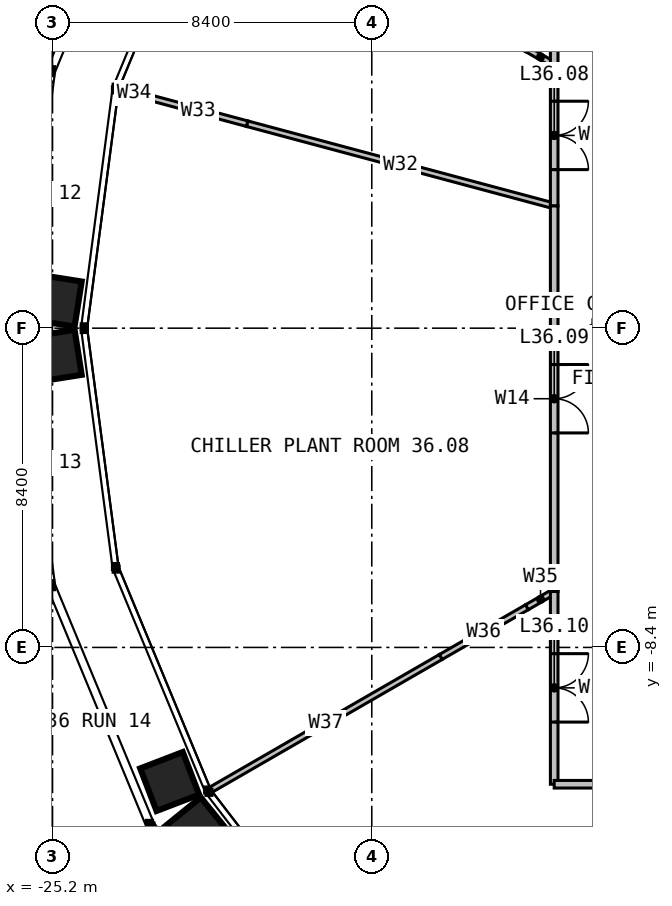
"""IFC4 building model, lengths in metres.
Left out: names, types, materials, properties, quantities, classifications, styles, units other than length and angle.
Written with IfcOpenShell. Run it as: python <this file> out.ifc"""

import sys

from ifc_helpers import new_model, si_unit, direction, frame, frame_2d, origin, place, context, subcontext, project, spatial, rectangle, extrude, element, fill, save


model = new_model("IFC4")
c1 = context("Model", 3, precision=1e-05, world=origin(), true_north=direction((0.0, 1.0)))
c2 = subcontext(c1, "Body", "Model", "MODEL_VIEW")
j1 = project(units=[si_unit("LENGTHUNIT", "METRE"), si_unit("PLANEANGLEUNIT", "RADIAN")], contexts=[c1])
p1 = place(None, origin())
s1 = spatial("IfcSite", under=j1, at=p1, CompositionType="ELEMENT")
p2 = place(p1, origin())
s2 = spatial("IfcBuilding", under=s1, at=p2, CompositionType="ELEMENT")
p3 = place(p2, frame((0.0, 0.0, 150.0)))
s3 = spatial("IfcBuildingStorey", under=s2, at=p3, CompositionType="ELEMENT", Elevation=150.0)
p4 = place(p3, frame((-12.0, 6.928, 0.0), z_axis=(0.0, 0.0, 1.0), x_axis=(-0.86608282171, 0.499900536046, 0.0)))
e1 = element("IfcWall", 1, at=p4, inside=s3, PredefinedType="PARTITIONING", context=c2, shape_type="SweptSolid", body=[
    extrude(rectangle(XDim=0.831, YDim=0.15, at=frame_2d((0.416, 0.0))), origin(), (0.0, 0.0, 1.0), 4.8),
])
p5 = place(p3, frame((-12.0, 3.215, 0.0), z_axis=(0.0, 0.0, 1.0), x_axis=(-0.965920824038, 0.258837713037, 0.0)))
e2 = element("IfcWall", 2, at=p5, inside=s3, PredefinedType="PARTITIONING", context=c2, shape_type="SweptSolid", body=[
    extrude(rectangle(XDim=8.365, YDim=0.15, at=frame_2d((4.183, 0.0))), origin(), (0.0, 0.0, 1.0), 4.8),
])
p6 = place(p3, frame((-20.08, 5.381, 0.0), z_axis=(0.0, 0.0, 1.0), x_axis=(-0.965936190415, 0.258780362559, 0.0)))
e3 = element("IfcWall", 3, at=p6, inside=s3, PredefinedType="PARTITIONING", context=c2, shape_type="SweptSolid", body=[
    extrude(rectangle(XDim=2.664, YDim=0.15, at=frame_2d((1.332, 0.0))), origin(), (0.0, 0.0, 1.0), 3.79),
])
p7 = place(p3, frame((-22.654, 6.07, 0.0), z_axis=(0.0, 0.0, 1.0), x_axis=(-0.96592035307, 0.258839470569, 0.0)))
e4 = element("IfcWall", 4, at=p7, inside=s3, PredefinedType="PARTITIONING", context=c2, shape_type="SweptSolid", body=[
    extrude(rectangle(XDim=0.826, YDim=0.15, at=frame_2d((0.413, 0.0))), origin(), (0.0, 0.0, 1.0), 4.8),
])
p8 = place(p3, frame((-12.0, -6.928, 0.0), z_axis=(0.0, 0.0, 1.0), x_axis=(-0.86608282171, -0.499900536046, 0.0)))
e5 = element("IfcWall", 5, at=p8, inside=s3, PredefinedType="PARTITIONING", context=c2, shape_type="SweptSolid", body=[
    extrude(rectangle(XDim=0.831, YDim=0.15, at=frame_2d((0.416, 0.0))), origin(), (0.0, 0.0, 1.0), 4.8),
])
p9 = place(p3, frame((-12.719, -7.344, 0.0), z_axis=(0.0, 0.0, 1.0), x_axis=(-0.866002361659, -0.500039908008, 0.0)))
e6 = element("IfcWall", 6, at=p9, inside=s3, PredefinedType="PARTITIONING", context=c2, shape_type="SweptSolid", body=[
    extrude(rectangle(XDim=2.618, YDim=0.15, at=frame_2d((1.309, 0.0))), origin(), (0.0, 0.0, 1.0), 3.79),
])
p10 = place(p3, frame((-14.987, -8.653, 0.0), z_axis=(0.0, 0.0, 1.0), x_axis=(-0.86602409414, -0.500002268364, 0.0)))
e7 = element("IfcWall", 7, at=p10, inside=s3, PredefinedType="PARTITIONING", context=c2, shape_type="SweptSolid", body=[
    extrude(rectangle(XDim=6.974, YDim=0.15, at=frame_2d((3.487, 0.0))), origin(), (0.0, 0.0, 1.0), 4.8),
])
p11 = place(p3, frame((-6.928, -12.0, 0.0), z_axis=(0.0, 0.0, 1.0), x_axis=(-0.500003616288, -0.866023315909, 0.0)))
e8 = element("IfcWall", 8, at=p11, inside=s3, PredefinedType="PARTITIONING", context=c2, shape_type="SweptSolid", body=[
    extrude(rectangle(XDim=10.423, YDim=0.15, at=frame_2d((5.211, 0.0))), origin(), (0.0, 0.0, 1.0), 4.8),
])
p12 = place(p3, frame((-12.0, 12.0, 0.0), z_axis=(0.0, 0.0, 1.0), x_axis=(0.0, -1.0, 0.0)))
e9 = element("IfcWall", 9, at=p12, inside=s3, PredefinedType="PARTITIONING", context=c2, shape_type="SweptSolid", body=[
    extrude(rectangle(XDim=5.072, YDim=0.2, at=frame_2d((2.536, 0.0))), origin(), (0.0, 0.0, 1.0), 4.8),
])
p13 = place(p3, frame((-12.0, 6.928, 0.0), z_axis=(0.0, 0.0, 1.0), x_axis=(0.0, -1.0, 0.0)))
e10 = element("IfcWall", 10, at=p13, inside=s3, PredefinedType="PARTITIONING", context=c2, shape_type="SweptSolid", body=[
    extrude(rectangle(XDim=3.713, YDim=0.2, at=frame_2d((1.856, 0.0))), origin(), (0.0, 0.0, 1.0), 4.8),
])
p14 = place(p13, frame((0.956, 0.0, 0.0)))
e11 = element("IfcOpeningElement", 11, at=p14, cuts=e10, PredefinedType="OPENING", context=c2, shape_type="SweptSolid", body=[
    extrude(rectangle(XDim=1.8, YDim=2.2, at=frame_2d((0.9, 1.1))), frame((0.0, 0.11, 0.0), z_axis=(0.0, -1.0, 0.0), x_axis=(1.0, 0.0, 0.0)), (0.0, 0.0, 1.0), 0.22),
])
p15 = place(p3, frame((-12.0, 3.215, 0.0), z_axis=(0.0, 0.0, 1.0), x_axis=(0.0, -1.0, 0.0)))
e12 = element("IfcWall", 12, at=p15, inside=s3, PredefinedType="PARTITIONING", context=c2, shape_type="SweptSolid", body=[
    extrude(rectangle(XDim=10.144, YDim=0.2, at=frame_2d((5.072, 0.0))), origin(), (0.0, 0.0, 1.0), 4.8),
])
p16 = place(p15, frame((4.172, 0.0, 0.0)))
e13 = element("IfcOpeningElement", 13, at=p16, cuts=e12, PredefinedType="OPENING", context=c2, shape_type="SweptSolid", body=[
    extrude(rectangle(XDim=1.8, YDim=2.2, at=frame_2d((0.9, 1.1))), frame((0.0, 0.11, 0.0), z_axis=(0.0, -1.0, 0.0), x_axis=(1.0, 0.0, 0.0)), (0.0, 0.0, 1.0), 0.22),
])
p17 = place(p3, frame((-12.0, -6.928, 0.0), z_axis=(0.0, 0.0, 1.0), x_axis=(0.0, -1.0, 0.0)))
e14 = element("IfcWall", 14, at=p17, inside=s3, PredefinedType="PARTITIONING", context=c2, shape_type="SweptSolid", body=[
    extrude(rectangle(XDim=5.072, YDim=0.2, at=frame_2d((2.536, 0.0))), origin(), (0.0, 0.0, 1.0), 4.8),
])
p18 = place(p17, frame((1.636, 0.0, 0.0)))
e15 = element("IfcOpeningElement", 15, at=p18, cuts=e14, PredefinedType="OPENING", context=c2, shape_type="SweptSolid", body=[
    extrude(rectangle(XDim=1.8, YDim=2.2, at=frame_2d((0.9, 1.1))), frame((0.0, 0.11, 0.0), z_axis=(0.0, -1.0, 0.0), x_axis=(1.0, 0.0, 0.0)), (0.0, 0.0, 1.0), 0.22),
])
p19 = place(p3, frame((-12.0, -12.0, 0.0), z_axis=(0.0, 0.0, 1.0), x_axis=(1.0, 0.0, 0.0)))
e16 = element("IfcWall", 16, at=p19, inside=s3, PredefinedType="PARTITIONING", context=c2, shape_type="SweptSolid", body=[
    extrude(rectangle(XDim=5.072, YDim=0.2, at=frame_2d((2.536, 0.0))), origin(), (0.0, 0.0, 1.0), 4.8),
])
p20 = place(p14, origin())
e17 = element("IfcDoor", 17, at=p20, inside=s3, OperationType="DOUBLE_DOOR_SINGLE_SWING", PredefinedType="DOOR", context=c2, shape_type="SweptSolid", body=[
    extrude(rectangle(XDim=1.8, YDim=2.2, at=frame_2d((0.9, 1.1))), frame((0.0, 0.025, 0.0), z_axis=(0.0, -1.0, 0.0), x_axis=(1.0, 0.0, 0.0)), (0.0, 0.0, 1.0), 0.05),
])
fill(e11, e17)
p21 = place(p16, origin())
e18 = element("IfcDoor", 18, at=p21, inside=s3, OperationType="DOUBLE_DOOR_SINGLE_SWING", PredefinedType="DOOR", context=c2, shape_type="SweptSolid", body=[
    extrude(rectangle(XDim=1.8, YDim=2.2, at=frame_2d((0.9, 1.1))), frame((0.0, 0.025, 0.0), z_axis=(0.0, -1.0, 0.0), x_axis=(1.0, 0.0, 0.0)), (0.0, 0.0, 1.0), 0.05),
])
fill(e13, e18)
p22 = place(p18, origin())
e19 = element("IfcDoor", 19, at=p22, inside=s3, OperationType="DOUBLE_DOOR_SINGLE_SWING", PredefinedType="DOOR", context=c2, shape_type="SweptSolid", body=[
    extrude(rectangle(XDim=1.8, YDim=2.2, at=frame_2d((0.9, 1.1))), frame((0.0, 0.025, 0.0), z_axis=(0.0, -1.0, 0.0), x_axis=(1.0, 0.0, 0.0)), (0.0, 0.0, 1.0), 0.05),
])
fill(e15, e19)
save(model, sys.argv[1])
